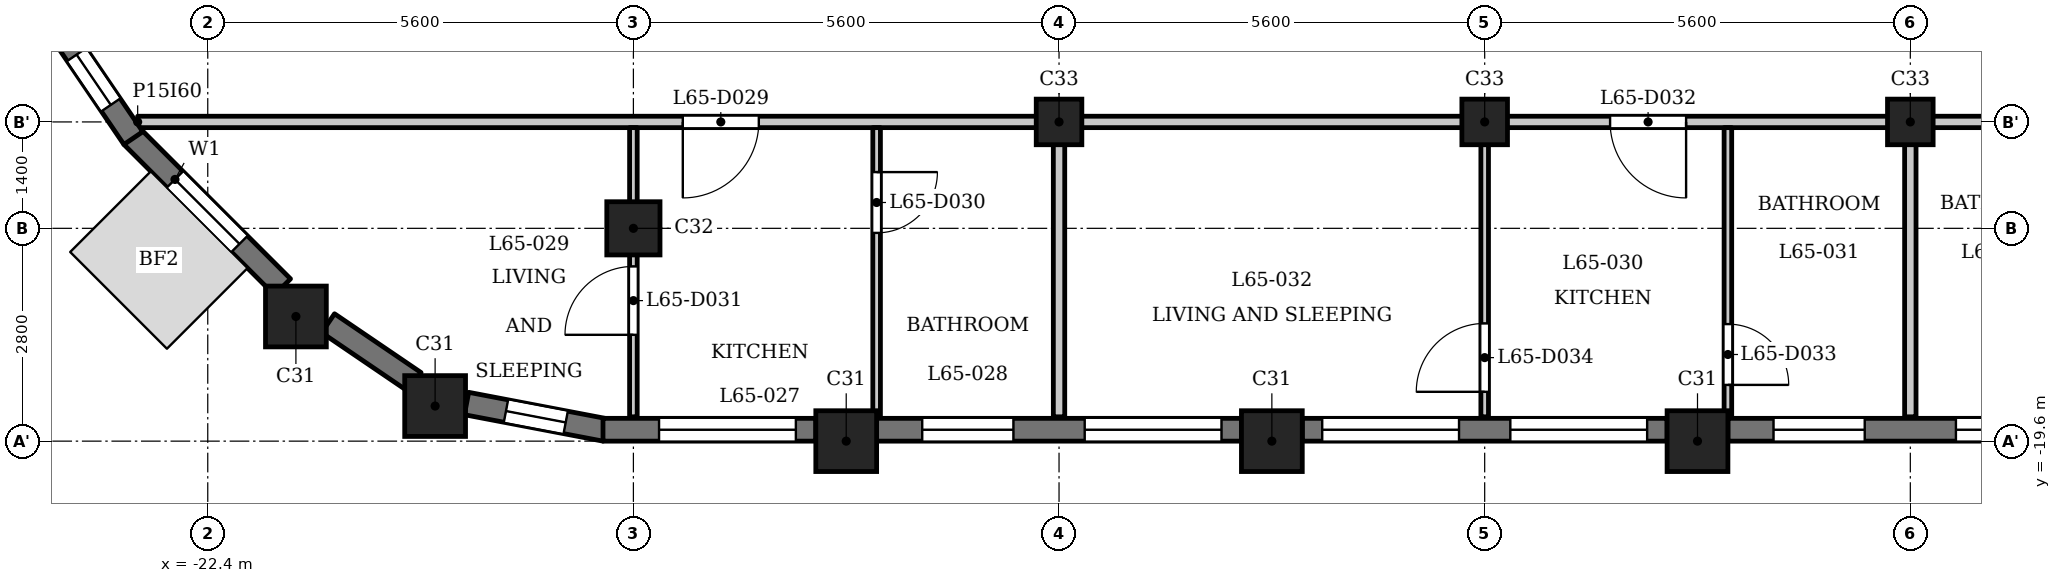
"""IFC4 building model, lengths in metres.
Left out: names, types, materials, properties, quantities, classifications, styles, units other than length and angle.
Written with IfcOpenShell. Run it as: python <this file> out.ifc"""

import sys

from ifc_helpers import new_model, si_unit, direction, frame, frame_2d, origin, origin_2d, place, context, subcontext, project, spatial, rectangle, extrude, element, fill, save


model = new_model("IFC4")
c1 = context("Model", 3, precision=1e-05, world=origin(), true_north=direction((0.0, 1.0)))
c2 = subcontext(c1, "Body", "Model", "MODEL_VIEW")
j1 = project(units=[si_unit("LENGTHUNIT", "METRE"), si_unit("PLANEANGLEUNIT", "RADIAN")], contexts=[c1])
p1 = place(None, origin())
s1 = spatial("IfcSite", under=j1, at=p1, CompositionType="ELEMENT")
p2 = place(p1, origin())
s2 = spatial("IfcBuilding", under=s1, at=p2, CompositionType="ELEMENT")
p3 = place(p2, frame((0.0, 0.0, 252.2)))
s3 = spatial("IfcBuildingStorey", under=s2, at=p3, CompositionType="ELEMENT", Elevation=252.2)
for number, where, z_axis, x_axis in (
    (1, (-19.409, -19.138, 0.0), (0.0, 0.0, 1.0), (1.0, 0.0, 0.0)),
    (2, (-14.0, -19.6, 0.0), (0.0, 0.0, 1.0), (1.0, 0.0, 0.0)),
    (3, (-8.4, -19.6, 0.0), (0.0, 0.0, 1.0), (1.0, 0.0, 0.0)),
    (4, (-2.8, -19.6, 0.0), (0.0, 0.0, 1.0), (1.0, 0.0, 0.0)),
    (5, (-21.24, -17.96, 0.0), (0.0, 0.0, 1.0), (1.0, 0.0, 0.0)),
):
    element("IfcColumn", number, at=place(p3, frame(where, z_axis=z_axis, x_axis=x_axis)), inside=s3, PredefinedType="COLUMN", context=c2, shape_type="SweptSolid", body=[
        extrude(rectangle(XDim=0.8, YDim=0.8, at=origin_2d()), origin(), (0.0, 0.0, 1.0), 3.5),
    ])
p4 = place(p3, frame((-16.8, -16.8, 0.0), z_axis=(0.0, 0.0, 1.0), x_axis=(1.0, 0.0, 0.0)))
e6 = element("IfcColumn", 6, at=p4, inside=s3, PredefinedType="COLUMN", context=c2, shape_type="SweptSolid", body=[
    extrude(rectangle(XDim=0.7, YDim=0.7, at=origin_2d()), origin(), (0.0, 0.0, 1.0), 3.5),
])
for number, where, z_axis, x_axis in (
    (7, (-11.2, -15.4, 0.0), (0.0, 0.0, 1.0), (1.0, 0.0, 0.0)),
    (8, (-5.6, -15.4, 0.0), (0.0, 0.0, 1.0), (1.0, 0.0, 0.0)),
    (9, (0.0, -15.4, 0.0), (0.0, 0.0, 1.0), (1.0, 0.0, 0.0)),
):
    element("IfcColumn", number, at=place(p3, frame(where, z_axis=z_axis, x_axis=x_axis)), inside=s3, PredefinedType="COLUMN", context=c2, shape_type="SweptSolid", body=[
        extrude(rectangle(XDim=0.6, YDim=0.6, at=origin_2d()), origin(), (0.0, 0.0, 1.0), 3.5),
    ])
p5 = place(p3, frame((-23.397, -15.591, 0.0), z_axis=(0.0, 0.0, 1.0), x_axis=(0.707150377276, -0.707063182409, 0.0)))
e10 = element("IfcWall", 10, at=p5, inside=s3, PredefinedType="SOLIDWALL", context=c2, shape_type="SweptSolid", body=[
    extrude(rectangle(XDim=2.8, YDim=0.3, at=frame_2d((1.4, 0.0))), origin(), (0.0, 0.0, 1.0), 2.55),
])
p6 = place(p5, frame((0.8, 0.0, 0.6)))
e11 = element("IfcOpeningElement", 11, at=p6, cuts=e10, PredefinedType="OPENING", context=c2, shape_type="SweptSolid", body=[
    extrude(rectangle(XDim=1.2, YDim=1.55, at=frame_2d((0.6, 0.775))), frame((0.0, 0.16, 0.0), z_axis=(0.0, -1.0, 0.0), x_axis=(1.0, 0.0, 0.0)), (0.0, 0.0, 1.0), 0.32),
])
p7 = place(p3, frame((-20.817, -18.048, 0.0), z_axis=(0.0, 0.0, 1.0), x_axis=(0.827025410886, -0.562164539747, 0.0)))
e12 = element("IfcWall", 12, at=p7, inside=s3, PredefinedType="SOLIDWALL", context=c2, shape_type="SweptSolid", body=[
    extrude(rectangle(XDim=1.377, YDim=0.3, at=frame_2d((0.688, 0.0))), origin(), (0.0, 0.0, 1.0), 2.55),
])
p8 = place(p3, frame((-18.995, -19.105, 0.0), z_axis=(0.0, 0.0, 1.0), x_axis=(0.982301706131, -0.187305520826, 0.0)))
e13 = element("IfcWall", 13, at=p8, inside=s3, PredefinedType="SOLIDWALL", context=c2, shape_type="SweptSolid", body=[
    extrude(rectangle(XDim=1.856, YDim=0.3, at=frame_2d((0.928, 0.0))), origin(), (0.0, 0.0, 1.0), 2.55),
])
p9 = place(p8, frame((0.528, 0.0, 0.6)))
e14 = element("IfcOpeningElement", 14, at=p9, cuts=e13, PredefinedType="OPENING", context=c2, shape_type="SweptSolid", body=[
    extrude(rectangle(XDim=0.8, YDim=1.55, at=frame_2d((0.4, 0.775))), frame((0.0, 0.16, 0.0), z_axis=(0.0, -1.0, 0.0), x_axis=(1.0, 0.0, 0.0)), (0.0, 0.0, 1.0), 0.32),
])
p10 = place(p3, frame((-17.2, -19.45, 0.0), z_axis=(0.0, 0.0, 1.0), x_axis=(1.0, 0.0, 0.0)))
e15 = element("IfcWall", 15, at=p10, inside=s3, PredefinedType="SOLIDWALL", context=c2, shape_type="SweptSolid", body=[
    extrude(rectangle(XDim=2.8, YDim=0.3, at=frame_2d((1.4, 0.0))), origin(), (0.0, 0.0, 1.0), 2.55),
])
p11 = place(p10, frame((0.738, 0.0, 0.9)))
e16 = element("IfcOpeningElement", 16, at=p11, cuts=e15, PredefinedType="OPENING", context=c2, shape_type="SweptSolid", body=[
    extrude(rectangle(XDim=1.8, YDim=1.25, at=frame_2d((0.9, 0.625))), frame((0.0, 0.16, 0.0), z_axis=(0.0, -1.0, 0.0), x_axis=(1.0, 0.0, 0.0)), (0.0, 0.0, 1.0), 0.32),
])
p12 = place(p3, frame((-13.6, -19.45, 0.0), z_axis=(0.0, 0.0, 1.0), x_axis=(1.0, 0.0, 0.0)))
e17 = element("IfcWall", 17, at=p12, inside=s3, PredefinedType="SOLIDWALL", context=c2, shape_type="SweptSolid", body=[
    extrude(rectangle(XDim=4.8, YDim=0.3, at=frame_2d((2.4, 0.0))), origin(), (0.0, 0.0, 1.0), 2.55),
])
p13 = place(p12, frame((0.6, 0.0, 0.6)))
e18 = element("IfcOpeningElement", 18, at=p13, cuts=e17, PredefinedType="OPENING", context=c2, shape_type="SweptSolid", body=[
    extrude(rectangle(XDim=1.2, YDim=1.55, at=frame_2d((0.6, 0.775))), frame((0.0, 0.16, 0.0), z_axis=(0.0, -1.0, 0.0), x_axis=(1.0, 0.0, 0.0)), (0.0, 0.0, 1.0), 0.32),
])
p14 = place(p12, frame((2.738, 0.0, 0.9)))
e19 = element("IfcOpeningElement", 19, at=p14, cuts=e17, PredefinedType="OPENING", context=c2, shape_type="SweptSolid", body=[
    extrude(rectangle(XDim=1.8, YDim=1.25, at=frame_2d((0.9, 0.625))), frame((0.0, 0.16, 0.0), z_axis=(0.0, -1.0, 0.0), x_axis=(1.0, 0.0, 0.0)), (0.0, 0.0, 1.0), 0.32),
])
p15 = place(p3, frame((-8.0, -19.45, 0.0), z_axis=(0.0, 0.0, 1.0), x_axis=(1.0, 0.0, 0.0)))
e20 = element("IfcWall", 20, at=p15, inside=s3, PredefinedType="SOLIDWALL", context=c2, shape_type="SweptSolid", body=[
    extrude(rectangle(XDim=4.8, YDim=0.3, at=frame_2d((2.4, 0.0))), origin(), (0.0, 0.0, 1.0), 2.55),
])
p16 = place(p15, frame((0.262, 0.0, 0.9)))
e21 = element("IfcOpeningElement", 21, at=p16, cuts=e20, PredefinedType="OPENING", context=c2, shape_type="SweptSolid", body=[
    extrude(rectangle(XDim=1.8, YDim=1.25, at=frame_2d((0.9, 0.625))), frame((0.0, 0.16, 0.0), z_axis=(0.0, -1.0, 0.0), x_axis=(1.0, 0.0, 0.0)), (0.0, 0.0, 1.0), 0.32),
])
p17 = place(p15, frame((2.738, 0.0, 0.9)))
e22 = element("IfcOpeningElement", 22, at=p17, cuts=e20, PredefinedType="OPENING", context=c2, shape_type="SweptSolid", body=[
    extrude(rectangle(XDim=1.8, YDim=1.25, at=frame_2d((0.9, 0.625))), frame((0.0, 0.16, 0.0), z_axis=(0.0, -1.0, 0.0), x_axis=(1.0, 0.0, 0.0)), (0.0, 0.0, 1.0), 0.32),
])
p18 = place(p3, frame((-2.4, -19.45, 0.0), z_axis=(0.0, 0.0, 1.0), x_axis=(1.0, 0.0, 0.0)))
e23 = element("IfcWall", 23, at=p18, inside=s3, PredefinedType="SOLIDWALL", context=c2, shape_type="SweptSolid", body=[
    extrude(rectangle(XDim=4.8, YDim=0.3, at=frame_2d((2.4, 0.0))), origin(), (0.0, 0.0, 1.0), 2.55),
])
p19 = place(p18, frame((0.6, 0.0, 0.6)))
e24 = element("IfcOpeningElement", 24, at=p19, cuts=e23, PredefinedType="OPENING", context=c2, shape_type="SweptSolid", body=[
    extrude(rectangle(XDim=1.2, YDim=1.55, at=frame_2d((0.6, 0.775))), frame((0.0, 0.16, 0.0), z_axis=(0.0, -1.0, 0.0), x_axis=(1.0, 0.0, 0.0)), (0.0, 0.0, 1.0), 0.32),
])
p20 = place(p18, frame((3.0, 0.0, 0.6)))
e25 = element("IfcOpeningElement", 25, at=p20, cuts=e23, PredefinedType="OPENING", context=c2, shape_type="SweptSolid", body=[
    extrude(rectangle(XDim=1.2, YDim=1.55, at=frame_2d((0.6, 0.775))), frame((0.0, 0.16, 0.0), z_axis=(0.0, -1.0, 0.0), x_axis=(1.0, 0.0, 0.0)), (0.0, 0.0, 1.0), 0.32),
])
p21 = place(p3, frame((-24.422, -14.078, 0.0), z_axis=(0.0, 0.0, 1.0), x_axis=(0.562054549384, -0.827100165347, 0.0)))
e26 = element("IfcWall", 26, at=p21, inside=s3, PredefinedType="SOLIDWALL", context=c2, shape_type="SweptSolid", body=[
    extrude(rectangle(XDim=1.856, YDim=0.3, at=frame_2d((0.928, 0.0))), origin(), (0.0, 0.0, 1.0), 2.55),
])
p22 = place(p21, frame((0.528, 0.0, 0.6)))
e27 = element("IfcOpeningElement", 27, at=p22, cuts=e26, PredefinedType="OPENING", context=c2, shape_type="SweptSolid", body=[
    extrude(rectangle(XDim=0.8, YDim=1.55, at=frame_2d((0.4, 0.775))), frame((0.0, 0.16, 0.0), z_axis=(0.0, -1.0, 0.0), x_axis=(1.0, 0.0, 0.0)), (0.0, 0.0, 1.0), 0.32),
])
p23 = place(p3, frame((-23.322, -15.4, 0.0), z_axis=(0.0, 0.0, 1.0), x_axis=(1.0, 0.0, 0.0)))
e28 = element("IfcWall", 28, at=p23, inside=s3, PredefinedType="PARTITIONING", context=c2, shape_type="SweptSolid", body=[
    extrude(rectangle(XDim=46.872, YDim=0.15, at=frame_2d((23.436, 0.0))), origin(), (0.0, 0.0, 1.0), 3.2),
])
p24 = place(p23, frame((7.172, 0.0, 0.0)))
e29 = element("IfcOpeningElement", 29, at=p24, cuts=e28, PredefinedType="OPENING", context=c2, shape_type="SweptSolid", body=[
    extrude(rectangle(XDim=1.0, YDim=2.1, at=frame_2d((0.5, 1.05))), frame((0.0, 0.085, 0.0), z_axis=(0.0, -1.0, 0.0), x_axis=(1.0, 0.0, 0.0)), (0.0, 0.0, 1.0), 0.17),
])
p25 = place(p23, frame((19.372, 0.0, 0.0)))
e30 = element("IfcOpeningElement", 30, at=p25, cuts=e28, PredefinedType="OPENING", context=c2, shape_type="SweptSolid", body=[
    extrude(rectangle(XDim=1.0, YDim=2.1, at=frame_2d((0.5, 1.05))), frame((0.0, 0.085, 0.0), z_axis=(0.0, -1.0, 0.0), x_axis=(1.0, 0.0, 0.0)), (0.0, 0.0, 1.0), 0.17),
])
p26 = place(p23, frame((26.372, 0.0, 0.0)))
e31 = element("IfcOpeningElement", 31, at=p26, cuts=e28, PredefinedType="OPENING", context=c2, shape_type="SweptSolid", body=[
    extrude(rectangle(XDim=1.0, YDim=2.1, at=frame_2d((0.5, 1.05))), frame((0.0, 0.085, 0.0), z_axis=(0.0, -1.0, 0.0), x_axis=(1.0, 0.0, 0.0)), (0.0, 0.0, 1.0), 0.17),
])
p27 = place(p23, frame((38.572, 0.0, 0.0)))
e32 = element("IfcOpeningElement", 32, at=p27, cuts=e28, PredefinedType="OPENING", context=c2, shape_type="SweptSolid", body=[
    extrude(rectangle(XDim=1.0, YDim=2.1, at=frame_2d((0.5, 1.05))), frame((0.0, 0.085, 0.0), z_axis=(0.0, -1.0, 0.0), x_axis=(1.0, 0.0, 0.0)), (0.0, 0.0, 1.0), 0.17),
])
p28 = place(p3, frame((-16.8, -19.28, 0.0), z_axis=(0.0, 0.0, 1.0), x_axis=(0.0, 1.0, 0.0)))
e33 = element("IfcWall", 33, at=p28, inside=s3, PredefinedType="PARTITIONING", context=c2, shape_type="SweptSolid", body=[
    extrude(rectangle(XDim=3.805, YDim=0.1, at=frame_2d((1.902, 0.0))), origin(), (0.0, 0.0, 1.0), 3.2),
])
p29 = place(p28, frame((1.079, 0.0, 0.0)))
e34 = element("IfcOpeningElement", 34, at=p29, cuts=e33, PredefinedType="OPENING", context=c2, shape_type="SweptSolid", body=[
    extrude(rectangle(XDim=0.9, YDim=2.1, at=frame_2d((0.45, 1.05))), frame((0.0, 0.06, 0.0), z_axis=(0.0, -1.0, 0.0), x_axis=(1.0, 0.0, 0.0)), (0.0, 0.0, 1.0), 0.12),
])
p30 = place(p3, frame((-13.6, -19.28, 0.0), z_axis=(0.0, 0.0, 1.0), x_axis=(0.0, 1.0, 0.0)))
e35 = element("IfcWall", 35, at=p30, inside=s3, PredefinedType="PARTITIONING", context=c2, shape_type="SweptSolid", body=[
    extrude(rectangle(XDim=3.805, YDim=0.1, at=frame_2d((1.902, 0.0))), origin(), (0.0, 0.0, 1.0), 3.2),
])
p31 = place(p30, frame((2.42, 0.0, 0.0)))
e36 = element("IfcOpeningElement", 36, at=p31, cuts=e35, PredefinedType="OPENING", context=c2, shape_type="SweptSolid", body=[
    extrude(rectangle(XDim=0.8, YDim=2.1, at=frame_2d((0.4, 1.05))), frame((0.0, 0.06, 0.0), z_axis=(0.0, -1.0, 0.0), x_axis=(1.0, 0.0, 0.0)), (0.0, 0.0, 1.0), 0.12),
])
p32 = place(p3, frame((-11.2, -19.28, 0.0), z_axis=(0.0, 0.0, 1.0), x_axis=(0.0, 1.0, 0.0)))
e37 = element("IfcWall", 37, at=p32, inside=s3, PredefinedType="PARTITIONING", context=c2, shape_type="SweptSolid", body=[
    extrude(rectangle(XDim=3.805, YDim=0.15, at=frame_2d((1.902, 0.0))), origin(), (0.0, 0.0, 1.0), 3.2),
])
p33 = place(p3, frame((-5.6, -19.28, 0.0), z_axis=(0.0, 0.0, 1.0), x_axis=(0.0, 1.0, 0.0)))
e38 = element("IfcWall", 38, at=p33, inside=s3, PredefinedType="PARTITIONING", context=c2, shape_type="SweptSolid", body=[
    extrude(rectangle(XDim=3.805, YDim=0.1, at=frame_2d((1.902, 0.0))), origin(), (0.0, 0.0, 1.0), 3.2),
])
p34 = place(p33, frame((0.329, 0.0, 0.0)))
e39 = element("IfcOpeningElement", 39, at=p34, cuts=e38, PredefinedType="OPENING", context=c2, shape_type="SweptSolid", body=[
    extrude(rectangle(XDim=0.9, YDim=2.1, at=frame_2d((0.45, 1.05))), frame((0.0, 0.06, 0.0), z_axis=(0.0, -1.0, 0.0), x_axis=(1.0, 0.0, 0.0)), (0.0, 0.0, 1.0), 0.12),
])
p35 = place(p3, frame((-2.4, -19.28, 0.0), z_axis=(0.0, 0.0, 1.0), x_axis=(0.0, 1.0, 0.0)))
e40 = element("IfcWall", 40, at=p35, inside=s3, PredefinedType="PARTITIONING", context=c2, shape_type="SweptSolid", body=[
    extrude(rectangle(XDim=3.805, YDim=0.1, at=frame_2d((1.902, 0.0))), origin(), (0.0, 0.0, 1.0), 3.2),
])
p36 = place(p35, frame((0.42, 0.0, 0.0)))
e41 = element("IfcOpeningElement", 41, at=p36, cuts=e40, PredefinedType="OPENING", context=c2, shape_type="SweptSolid", body=[
    extrude(rectangle(XDim=0.8, YDim=2.1, at=frame_2d((0.4, 1.05))), frame((0.0, 0.06, 0.0), z_axis=(0.0, -1.0, 0.0), x_axis=(1.0, 0.0, 0.0)), (0.0, 0.0, 1.0), 0.12),
])
p37 = place(p3, frame((0.0, -19.28, 0.0), z_axis=(0.0, 0.0, 1.0), x_axis=(0.0, 1.0, 0.0)))
e42 = element("IfcWall", 42, at=p37, inside=s3, PredefinedType="PARTITIONING", context=c2, shape_type="SweptSolid", body=[
    extrude(rectangle(XDim=3.805, YDim=0.15, at=frame_2d((1.902, 0.0))), origin(), (0.0, 0.0, 1.0), 3.2),
])
p38 = place(p24, origin())
e43 = element("IfcDoor", 43, at=p38, inside=s3, OperationType="SINGLE_SWING_LEFT", PredefinedType="DOOR", context=c2, shape_type="SweptSolid", body=[
    extrude(rectangle(XDim=1.0, YDim=2.1, at=frame_2d((0.5, 1.05))), frame((0.0, 0.025, 0.0), z_axis=(0.0, -1.0, 0.0), x_axis=(1.0, 0.0, 0.0)), (0.0, 0.0, 1.0), 0.05),
])
fill(e29, e43)
p39 = place(p31, origin())
e44 = element("IfcDoor", 44, at=p39, inside=s3, OperationType="SINGLE_SWING_RIGHT", PredefinedType="DOOR", context=c2, shape_type="SweptSolid", body=[
    extrude(rectangle(XDim=0.8, YDim=2.1, at=frame_2d((0.4, 1.05))), frame((0.0, 0.025, 0.0), z_axis=(0.0, -1.0, 0.0), x_axis=(1.0, 0.0, 0.0)), (0.0, 0.0, 1.0), 0.05),
])
fill(e36, e44)
p40 = place(p29, origin())
e45 = element("IfcDoor", 45, at=p40, inside=s3, OperationType="SINGLE_SWING_RIGHT", PredefinedType="DOOR", context=c2, shape_type="SweptSolid", body=[
    extrude(rectangle(XDim=0.9, YDim=2.1, at=frame_2d((0.45, 1.05))), frame((0.0, 0.025, 0.0), z_axis=(0.0, -1.0, 0.0), x_axis=(1.0, 0.0, 0.0)), (0.0, 0.0, 1.0), 0.05),
])
fill(e34, e45)
p41 = place(p25, origin())
e46 = element("IfcDoor", 46, at=p41, inside=s3, OperationType="SINGLE_SWING_RIGHT", PredefinedType="DOOR", context=c2, shape_type="SweptSolid", body=[
    extrude(rectangle(XDim=1.0, YDim=2.1, at=frame_2d((0.5, 1.05))), frame((0.0, 0.025, 0.0), z_axis=(0.0, -1.0, 0.0), x_axis=(1.0, 0.0, 0.0)), (0.0, 0.0, 1.0), 0.05),
])
fill(e30, e46)
p42 = place(p36, origin())
e47 = element("IfcDoor", 47, at=p42, inside=s3, OperationType="SINGLE_SWING_LEFT", PredefinedType="DOOR", context=c2, shape_type="SweptSolid", body=[
    extrude(rectangle(XDim=0.8, YDim=2.1, at=frame_2d((0.4, 1.05))), frame((0.0, 0.025, 0.0), z_axis=(0.0, -1.0, 0.0), x_axis=(1.0, 0.0, 0.0)), (0.0, 0.0, 1.0), 0.05),
])
fill(e41, e47)
p43 = place(p34, origin())
e48 = element("IfcDoor", 48, at=p43, inside=s3, OperationType="SINGLE_SWING_RIGHT", PredefinedType="DOOR", context=c2, shape_type="SweptSolid", body=[
    extrude(rectangle(XDim=0.9, YDim=2.1, at=frame_2d((0.45, 1.05))), frame((0.0, 0.025, 0.0), z_axis=(0.0, -1.0, 0.0), x_axis=(1.0, 0.0, 0.0)), (0.0, 0.0, 1.0), 0.05),
])
fill(e39, e48)
p44 = place(p6, origin())
e49 = element("IfcWindow", 49, at=p44, inside=s3, PartitioningType="SINGLE_PANEL", PredefinedType="WINDOW", context=c2, shape_type="SweptSolid", body=[
    extrude(rectangle(XDim=1.2, YDim=1.55, at=frame_2d((0.6, 0.775))), frame((0.0, 0.03, 0.0), z_axis=(0.0, -1.0, 0.0), x_axis=(1.0, 0.0, 0.0)), (0.0, 0.0, 1.0), 0.06),
])
fill(e11, e49)
p45 = place(p9, origin())
e50 = element("IfcWindow", 50, at=p45, inside=s3, PartitioningType="SINGLE_PANEL", PredefinedType="WINDOW", context=c2, shape_type="SweptSolid", body=[
    extrude(rectangle(XDim=0.8, YDim=1.55, at=frame_2d((0.4, 0.775))), frame((0.0, 0.03, 0.0), z_axis=(0.0, -1.0, 0.0), x_axis=(1.0, 0.0, 0.0)), (0.0, 0.0, 1.0), 0.06),
])
fill(e14, e50)
p46 = place(p11, origin())
e51 = element("IfcWindow", 51, at=p46, inside=s3, PartitioningType="SINGLE_PANEL", PredefinedType="WINDOW", context=c2, shape_type="SweptSolid", body=[
    extrude(rectangle(XDim=1.8, YDim=1.25, at=frame_2d((0.9, 0.625))), frame((0.0, 0.03, 0.0), z_axis=(0.0, -1.0, 0.0), x_axis=(1.0, 0.0, 0.0)), (0.0, 0.0, 1.0), 0.06),
])
fill(e16, e51)
p47 = place(p13, origin())
e52 = element("IfcWindow", 52, at=p47, inside=s3, PartitioningType="SINGLE_PANEL", PredefinedType="WINDOW", context=c2, shape_type="SweptSolid", body=[
    extrude(rectangle(XDim=1.2, YDim=1.55, at=frame_2d((0.6, 0.775))), frame((0.0, 0.03, 0.0), z_axis=(0.0, -1.0, 0.0), x_axis=(1.0, 0.0, 0.0)), (0.0, 0.0, 1.0), 0.06),
])
fill(e18, e52)
p48 = place(p14, origin())
e53 = element("IfcWindow", 53, at=p48, inside=s3, PartitioningType="SINGLE_PANEL", PredefinedType="WINDOW", context=c2, shape_type="SweptSolid", body=[
    extrude(rectangle(XDim=1.8, YDim=1.25, at=frame_2d((0.9, 0.625))), frame((0.0, 0.03, 0.0), z_axis=(0.0, -1.0, 0.0), x_axis=(1.0, 0.0, 0.0)), (0.0, 0.0, 1.0), 0.06),
])
fill(e19, e53)
p49 = place(p16, origin())
e54 = element("IfcWindow", 54, at=p49, inside=s3, PartitioningType="SINGLE_PANEL", PredefinedType="WINDOW", context=c2, shape_type="SweptSolid", body=[
    extrude(rectangle(XDim=1.8, YDim=1.25, at=frame_2d((0.9, 0.625))), frame((0.0, 0.03, 0.0), z_axis=(0.0, -1.0, 0.0), x_axis=(1.0, 0.0, 0.0)), (0.0, 0.0, 1.0), 0.06),
])
fill(e21, e54)
p50 = place(p17, origin())
e55 = element("IfcWindow", 55, at=p50, inside=s3, PartitioningType="SINGLE_PANEL", PredefinedType="WINDOW", context=c2, shape_type="SweptSolid", body=[
    extrude(rectangle(XDim=1.8, YDim=1.25, at=frame_2d((0.9, 0.625))), frame((0.0, 0.03, 0.0), z_axis=(0.0, -1.0, 0.0), x_axis=(1.0, 0.0, 0.0)), (0.0, 0.0, 1.0), 0.06),
])
fill(e22, e55)
p51 = place(p19, origin())
e56 = element("IfcWindow", 56, at=p51, inside=s3, PartitioningType="SINGLE_PANEL", PredefinedType="WINDOW", context=c2, shape_type="SweptSolid", body=[
    extrude(rectangle(XDim=1.2, YDim=1.55, at=frame_2d((0.6, 0.775))), frame((0.0, 0.03, 0.0), z_axis=(0.0, -1.0, 0.0), x_axis=(1.0, 0.0, 0.0)), (0.0, 0.0, 1.0), 0.06),
])
fill(e24, e56)
p52 = place(p20, origin())
e57 = element("IfcWindow", 57, at=p52, inside=s3, PartitioningType="SINGLE_PANEL", PredefinedType="WINDOW", context=c2, shape_type="SweptSolid", body=[
    extrude(rectangle(XDim=1.2, YDim=1.55, at=frame_2d((0.6, 0.775))), frame((0.0, 0.03, 0.0), z_axis=(0.0, -1.0, 0.0), x_axis=(1.0, 0.0, 0.0)), (0.0, 0.0, 1.0), 0.06),
])
fill(e25, e57)
p53 = place(p22, origin())
e58 = element("IfcWindow", 58, at=p53, inside=s3, PartitioningType="SINGLE_PANEL", PredefinedType="WINDOW", context=c2, shape_type="SweptSolid", body=[
    extrude(rectangle(XDim=0.8, YDim=1.55, at=frame_2d((0.4, 0.775))), frame((0.0, 0.03, 0.0), z_axis=(0.0, -1.0, 0.0), x_axis=(1.0, 0.0, 0.0)), (0.0, 0.0, 1.0), 0.06),
])
fill(e27, e58)
save(model, sys.argv[1])
